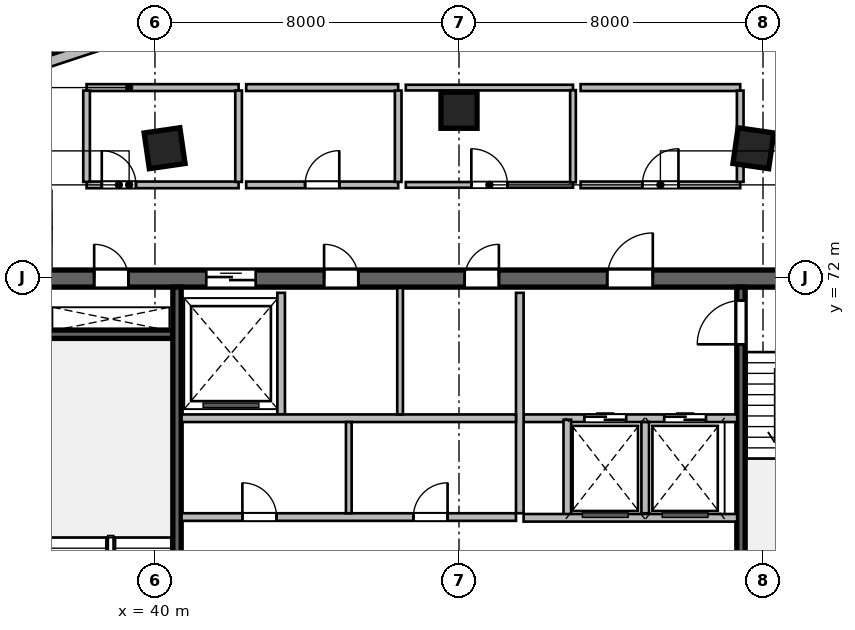
"""IFC4 building model, lengths in metres.
Left out: names, types, materials, properties, quantities, classifications, styles, units other than length and angle.
Written with IfcOpenShell. Run it as: python <this file> out.ifc"""

import sys

from ifc_helpers import new_model, si_unit, direction, frame, frame_2d, origin, origin_2d, place, context, subcontext, project, spatial, rectangle, extrude, source, transform, mapped, element, fill, save


model = new_model("IFC4")
c1 = context("Model", 3, precision=1e-05, world=origin(), true_north=direction((0.0, 1.0)))
c2 = subcontext(c1, "Body", "Model", "MODEL_VIEW")
j1 = project(units=[si_unit("LENGTHUNIT", "METRE"), si_unit("PLANEANGLEUNIT", "RADIAN")], contexts=[c1])
p1 = place(None, origin())
s1 = spatial("IfcSite", under=j1, at=p1, CompositionType="ELEMENT")
p2 = place(p1, origin())
s2 = spatial("IfcBuilding", under=s1, at=p2, CompositionType="ELEMENT")
p3 = place(p2, frame((0.0, 0.0, 235.2)))
s3 = spatial("IfcBuildingStorey", under=s2, at=p3, CompositionType="ELEMENT", Elevation=235.2)
m1 = source(origin(), c2, "Body", "SweptSolid", [
    extrude(rectangle(XDim=21.6, YDim=0.45, at=frame_2d((10.8, 0.0))), origin(), (0.0, 0.0, 1.0), 3.9),
])
p4 = place(p3, frame((37.2, 71.975, 0.0), z_axis=(0.0, 0.0, 1.0), x_axis=(1.0, 0.0, 0.0)))
e1 = element("IfcWall", 1, at=p4, inside=s3, PredefinedType="SHEAR", context=c2, shape_type="MappedRepresentation", body=[
    mapped(m1, transform((0.0, 0.0, 0.0), scale=1.0)),
])
p5 = place(p4, frame((1.2, 0.0, 0.0)))
e2 = element("IfcOpeningElement", 2, at=p5, cuts=e1, PredefinedType="OPENING", context=c2, shape_type="SweptSolid", body=[
    extrude(rectangle(XDim=0.9, YDim=2.1, at=frame_2d((0.45, 1.05))), frame((0.0, 0.235, 0.0), z_axis=(0.0, -1.0, 0.0), x_axis=(1.0, 0.0, 0.0)), (0.0, 0.0, 1.0), 0.47),
])
p6 = place(p4, frame((14.7, 0.0, 0.0)))
e3 = element("IfcOpeningElement", 3, at=p6, cuts=e1, PredefinedType="OPENING", context=c2, shape_type="SweptSolid", body=[
    extrude(rectangle(XDim=1.2, YDim=2.15, at=frame_2d((0.6, 1.075))), frame((0.0, 0.235, 0.0), z_axis=(0.0, -1.0, 0.0), x_axis=(1.0, 0.0, 0.0)), (0.0, 0.0, 1.0), 0.47),
])
p7 = place(p4, frame((4.15, 0.0, 0.0)))
e4 = element("IfcOpeningElement", 4, at=p7, cuts=e1, PredefinedType="OPENING", context=c2, shape_type="SweptSolid", body=[
    extrude(rectangle(XDim=1.3, YDim=2.15, at=frame_2d((0.65, 1.075))), frame((0.0, 0.235, 0.0), z_axis=(0.0, -1.0, 0.0), x_axis=(1.0, 0.0, 0.0)), (0.0, 0.0, 1.0), 0.47),
])
p8 = place(p4, frame((7.25, 0.0, 0.0)))
e5 = element("IfcOpeningElement", 5, at=p8, cuts=e1, PredefinedType="OPENING", context=c2, shape_type="SweptSolid", body=[
    extrude(rectangle(XDim=0.9, YDim=2.1, at=frame_2d((0.45, 1.05))), frame((0.0, 0.235, 0.0), z_axis=(0.0, -1.0, 0.0), x_axis=(1.0, 0.0, 0.0)), (0.0, 0.0, 1.0), 0.47),
])
p9 = place(p4, frame((10.95, 0.0, 0.0)))
e6 = element("IfcOpeningElement", 6, at=p9, cuts=e1, PredefinedType="OPENING", context=c2, shape_type="SweptSolid", body=[
    extrude(rectangle(XDim=0.9, YDim=2.1, at=frame_2d((0.45, 1.05))), frame((0.0, 0.235, 0.0), z_axis=(0.0, -1.0, 0.0), x_axis=(1.0, 0.0, 0.0)), (0.0, 0.0, 1.0), 0.47),
])
m2 = source(origin(), c2, "Body", "SweptSolid", [
    extrude(rectangle(XDim=3.27, YDim=0.22, at=frame_2d((1.635, 0.0))), origin(), (0.0, 0.0, 1.0), 3.9),
])
p10 = place(p3, frame((37.2, 70.51, 0.0), z_axis=(0.0, 0.0, 1.0), x_axis=(1.0, 0.0, 0.0)))
e7 = element("IfcWall", 7, at=p10, inside=s3, PredefinedType="SHEAR", context=c2, shape_type="MappedRepresentation", body=[
    mapped(m2, transform((0.0, 0.0, 0.0), scale=1.0)),
])
m3 = source(origin(), c2, "Body", "SweptSolid", [
    extrude(rectangle(XDim=11.1, YDim=0.22, at=frame_2d((5.55, 0.0))), origin(), (0.0, 0.0, 1.0), 3.9),
])
p11 = place(p3, frame((40.58, 60.65, 0.0), z_axis=(0.0, 0.0, 1.0), x_axis=(0.0, 1.0, 0.0)))
e8 = element("IfcWall", 8, at=p11, inside=s3, PredefinedType="SHEAR", context=c2, shape_type="MappedRepresentation", body=[
    mapped(m3, transform((0.0, 0.0, 0.0), scale=1.0)),
])
p12 = place(p3, frame((55.42, 60.65, 0.0), z_axis=(0.0, 0.0, 1.0), x_axis=(0.0, 1.0, 0.0)))
e9 = element("IfcWall", 9, at=p12, inside=s3, PredefinedType="SHEAR", context=c2, shape_type="MappedRepresentation", body=[
    mapped(m3, transform((0.0, 0.0, 0.0), scale=1.0)),
])
p13 = place(p12, frame((9.595, 0.0, 0.0)))
e10 = element("IfcOpeningElement", 10, at=p13, cuts=e9, PredefinedType="OPENING", context=c2, shape_type="SweptSolid", body=[
    extrude(rectangle(XDim=1.15, YDim=2.15, at=frame_2d((0.575, 1.075))), frame((0.0, 0.12, 0.0), z_axis=(0.0, -1.0, 0.0), x_axis=(1.0, 0.0, 0.0)), (0.0, 0.0, 1.0), 0.24),
])
m4 = source(origin(), c2, "Body", "SweptSolid", [
    extrude(rectangle(XDim=0.95, YDim=0.95, at=origin_2d()), origin(), (0.0, 0.0, 1.0), 3.9),
])
for number, where, z_axis, x_axis in (
    (11, (40.253, 75.404, 0.0), (0.0, 0.0, 1.0), (-0.143, 0.99, 0.0)),
    (12, (48.0, 76.404, 0.0), (0.0, 0.0, 1.0), (0.0, 1.0, 0.0)),
    (13, (55.747, 75.404, 0.0), (0.0, 0.0, 1.0), (0.143, 0.99, 0.0)),
):
    element("IfcColumn", number, at=place(p3, frame(where, z_axis=z_axis, x_axis=x_axis)), inside=s3, PredefinedType="COLUMN", context=c2, shape_type="MappedRepresentation", body=[
        mapped(m4, transform((0.0, 0.0, 0.0), scale=1.0)),
    ])
m5 = source(origin(), c2, "Body", "SweptSolid", [
    extrude(rectangle(XDim=3.557, YDim=0.28, at=frame_2d((1.778, 0.0))), origin(), (0.0, 0.0, 1.0), 3.65),
])
p14 = place(p3, frame((36.077, 77.307, 0.0), z_axis=(0.0, 0.0, 1.0), x_axis=(0.949687460385, 0.31319918197, 0.0)))
e14 = element("IfcWall", 14, at=p14, inside=s3, PredefinedType="SOLIDWALL", context=c2, shape_type="MappedRepresentation", body=[
    mapped(m5, transform((0.0, 0.0, 0.0), scale=1.0)),
])
m6 = source(origin(), c2, "Body", "SweptSolid", [
    extrude(rectangle(XDim=5.62, YDim=0.2, at=frame_2d((2.81, 0.0))), origin(), (0.0, 0.0, 1.0), 3.65),
])
p15 = place(p3, frame((49.7, 68.3, 0.0), z_axis=(0.0, 0.0, 1.0), x_axis=(1.0, 0.0, 0.0)))
e15 = element("IfcWall", 15, at=p15, inside=s3, PredefinedType="SOLIDWALL", context=c2, shape_type="MappedRepresentation", body=[
    mapped(m6, transform((0.0, 0.0, 0.0), scale=1.0)),
])
p16 = place(p15, frame((1.6, 0.0, 0.0)))
e16 = element("IfcOpeningElement", 16, at=p16, cuts=e15, PredefinedType="OPENING", context=c2, shape_type="SweptSolid", body=[
    extrude(rectangle(XDim=1.1, YDim=2.15, at=frame_2d((0.55, 1.075))), frame((0.0, 0.11, 0.0), z_axis=(0.0, -1.0, 0.0), x_axis=(1.0, 0.0, 0.0)), (0.0, 0.0, 1.0), 0.22),
])
p17 = place(p15, frame((3.7, 0.0, 0.0)))
e17 = element("IfcOpeningElement", 17, at=p17, cuts=e15, PredefinedType="OPENING", context=c2, shape_type="SweptSolid", body=[
    extrude(rectangle(XDim=1.1, YDim=2.15, at=frame_2d((0.55, 1.075))), frame((0.0, 0.11, 0.0), z_axis=(0.0, -1.0, 0.0), x_axis=(1.0, 0.0, 0.0)), (0.0, 0.0, 1.0), 0.22),
])
m7 = source(origin(), c2, "Body", "SweptSolid", [
    extrude(rectangle(XDim=5.8, YDim=0.2, at=frame_2d((2.9, 0.0))), origin(), (0.0, 0.0, 1.0), 3.65),
])
p18 = place(p3, frame((49.6, 65.8, 0.0), z_axis=(0.0, 0.0, 1.0), x_axis=(0.0, 1.0, 0.0)))
e18 = element("IfcWall", 18, at=p18, inside=s3, PredefinedType="SOLIDWALL", context=c2, shape_type="MappedRepresentation", body=[
    mapped(m7, transform((0.0, 0.0, 0.0), scale=1.0)),
])
m8 = source(origin(), c2, "Body", "SweptSolid", [
    extrude(rectangle(XDim=2.58, YDim=0.2, at=frame_2d((1.29, 0.0))), origin(), (0.0, 0.0, 1.0), 3.65),
])
p19 = place(p3, frame((50.85, 65.68, 0.0), z_axis=(0.0, 0.0, 1.0), x_axis=(0.0, 1.0, 0.0)))
e19 = element("IfcWall", 19, at=p19, inside=s3, PredefinedType="SOLIDWALL", context=c2, shape_type="MappedRepresentation", body=[
    mapped(m8, transform((0.0, 0.0, 0.0), scale=1.0)),
])
m9 = source(origin(), c2, "Body", "SweptSolid", [
    extrude(rectangle(XDim=2.4, YDim=0.2, at=frame_2d((1.2, 0.0))), origin(), (0.0, 0.0, 1.0), 3.65),
])
p20 = place(p3, frame((52.9, 65.8, 0.0), z_axis=(0.0, 0.0, 1.0), x_axis=(0.0, 1.0, 0.0)))
e20 = element("IfcWall", 20, at=p20, inside=s3, PredefinedType="SOLIDWALL", context=c2, shape_type="MappedRepresentation", body=[
    mapped(m9, transform((0.0, 0.0, 0.0), scale=1.0)),
])
p21 = place(p3, frame((49.7, 65.68, 0.0), z_axis=(0.0, 0.0, 1.0), x_axis=(1.0, 0.0, 0.0)))
e21 = element("IfcWall", 21, at=p21, inside=s3, PredefinedType="SOLIDWALL", context=c2, shape_type="MappedRepresentation", body=[
    mapped(m6, transform((0.0, 0.0, 0.0), scale=1.0)),
])
m10 = source(origin(), c2, "Body", "SweptSolid", [
    extrude(rectangle(XDim=3.2, YDim=0.2, at=frame_2d((1.6, 0.0))), origin(), (0.0, 0.0, 1.0), 3.65),
])
p22 = place(p3, frame((43.32, 68.4, 0.0), z_axis=(0.0, 0.0, 1.0), x_axis=(0.0, 1.0, 0.0)))
e22 = element("IfcWall", 22, at=p22, inside=s3, PredefinedType="SOLIDWALL", context=c2, shape_type="MappedRepresentation", body=[
    mapped(m10, transform((0.0, 0.0, 0.0), scale=1.0)),
])
m11 = source(origin(), c2, "Body", "SweptSolid", [
    extrude(rectangle(XDim=8.8, YDim=0.2, at=frame_2d((4.4, 0.0))), origin(), (0.0, 0.0, 1.0), 3.65),
])
p23 = place(p3, frame((40.7, 68.3, 0.0), z_axis=(0.0, 0.0, 1.0), x_axis=(1.0, 0.0, 0.0)))
e23 = element("IfcWall", 23, at=p23, inside=s3, PredefinedType="SOLIDWALL", context=c2, shape_type="MappedRepresentation", body=[
    mapped(m11, transform((0.0, 0.0, 0.0), scale=1.0)),
])
m12 = source(origin(), c2, "Body", "SweptSolid", [
    extrude(rectangle(XDim=3.33, YDim=0.15, at=frame_2d((1.665, 0.0))), origin(), (0.0, 0.0, 1.0), 3.65),
])
p24 = place(p3, frame((46.45, 68.4, 0.0), z_axis=(0.0, 0.0, 1.0), x_axis=(0.0, 1.0, 0.0)))
e24 = element("IfcWall", 24, at=p24, inside=s3, PredefinedType="PARTITIONING", context=c2, shape_type="MappedRepresentation", body=[
    mapped(m12, transform((0.0, 0.0, 0.0), scale=1.0)),
])
p25 = place(p3, frame((40.7, 65.7, 0.0), z_axis=(0.0, 0.0, 1.0), x_axis=(1.0, 0.0, 0.0)))
e25 = element("IfcWall", 25, at=p25, inside=s3, PredefinedType="SOLIDWALL", context=c2, shape_type="MappedRepresentation", body=[
    mapped(m11, transform((0.0, 0.0, 0.0), scale=1.0)),
])
p26 = place(p25, frame((1.6, 0.0, 0.0)))
e26 = element("IfcOpeningElement", 26, at=p26, cuts=e25, PredefinedType="OPENING", context=c2, shape_type="SweptSolid", body=[
    extrude(rectangle(XDim=0.9, YDim=2.1, at=frame_2d((0.45, 1.05))), frame((0.0, 0.11, 0.0), z_axis=(0.0, -1.0, 0.0), x_axis=(1.0, 0.0, 0.0)), (0.0, 0.0, 1.0), 0.22),
])
p27 = place(p25, frame((6.1, 0.0, 0.0)))
e27 = element("IfcOpeningElement", 27, at=p27, cuts=e25, PredefinedType="OPENING", context=c2, shape_type="SweptSolid", body=[
    extrude(rectangle(XDim=0.9, YDim=2.1, at=frame_2d((0.45, 1.05))), frame((0.0, 0.11, 0.0), z_axis=(0.0, -1.0, 0.0), x_axis=(1.0, 0.0, 0.0)), (0.0, 0.0, 1.0), 0.22),
])
m13 = source(origin(), c2, "Body", "SweptSolid", [
    extrude(rectangle(XDim=2.4, YDim=0.15, at=frame_2d((1.2, 0.0))), origin(), (0.0, 0.0, 1.0), 3.65),
])
p28 = place(p3, frame((45.1, 65.8, 0.0), z_axis=(0.0, 0.0, 1.0), x_axis=(0.0, 1.0, 0.0)))
e28 = element("IfcWall", 28, at=p28, inside=s3, PredefinedType="PARTITIONING", context=c2, shape_type="MappedRepresentation", body=[
    mapped(m13, transform((0.0, 0.0, 0.0), scale=1.0)),
])
m14 = source(origin(), c2, "Body", "SweptSolid", [
    extrude(rectangle(XDim=4.0, YDim=0.175, at=frame_2d((2.0, 0.0))), origin(), (0.0, 0.0, 1.0), 3.65),
])
p29 = place(p3, frame((38.2, 74.44, 0.0), z_axis=(0.0, 0.0, 1.0), x_axis=(1.0, 0.0, 0.0)))
e29 = element("IfcWall", 29, at=p29, inside=s3, PredefinedType="PARTITIONING", context=c2, shape_type="MappedRepresentation", body=[
    mapped(m14, transform((0.0, 0.0, 0.0), scale=1.0)),
])
p30 = place(p29, frame((0.4, 0.0, 0.0)))
e30 = element("IfcOpeningElement", 30, at=p30, cuts=e29, PredefinedType="OPENING", context=c2, shape_type="SweptSolid", body=[
    extrude(rectangle(XDim=0.9, YDim=2.08, at=frame_2d((0.45, 1.04))), frame((0.0, 0.098, 0.0), z_axis=(0.0, -1.0, 0.0), x_axis=(1.0, 0.0, 0.0)), (0.0, 0.0, 1.0), 0.195),
])
m15 = source(origin(), c2, "Body", "SweptSolid", [
    extrude(rectangle(XDim=4.0, YDim=0.18, at=frame_2d((2.0, 0.0))), origin(), (0.0, 0.0, 1.0), 3.65),
])
p31 = place(p3, frame((38.2, 77.0, 0.0), z_axis=(0.0, 0.0, 1.0), x_axis=(1.0, 0.0, 0.0)))
e31 = element("IfcWall", 31, at=p31, inside=s3, PredefinedType="PLUMBINGWALL", context=c2, shape_type="MappedRepresentation", body=[
    mapped(m15, transform((0.0, 0.0, 0.0), scale=1.0)),
])
m16 = source(origin(), c2, "Body", "SweptSolid", [
    extrude(rectangle(XDim=2.403, YDim=0.175, at=frame_2d((1.201, 0.0))), origin(), (0.0, 0.0, 1.0), 3.65),
])
for number, where, z_axis, x_axis in (
    (32, (38.2, 74.519, 0.0), (0.0, 0.0, 1.0), (0.0, 1.0, 0.0)),
    (33, (42.2, 74.519, 0.0), (0.0, 0.0, 1.0), (0.0, 1.0, 0.0)),
):
    element("IfcWall", number, at=place(p3, frame(where, z_axis=z_axis, x_axis=x_axis)), inside=s3, PredefinedType="PARTITIONING", context=c2, shape_type="MappedRepresentation", body=[
        mapped(m16, transform((0.0, 0.0, 0.0), scale=1.0)),
    ])
p32 = place(p3, frame((42.4, 74.44, 0.0), z_axis=(0.0, 0.0, 1.0), x_axis=(1.0, 0.0, 0.0)))
e34 = element("IfcWall", 34, at=p32, inside=s3, PredefinedType="PARTITIONING", context=c2, shape_type="MappedRepresentation", body=[
    mapped(m14, transform((0.0, 0.0, 0.0), scale=1.0)),
])
p33 = place(p32, frame((1.55, 0.0, 0.0)))
e35 = element("IfcOpeningElement", 35, at=p33, cuts=e34, PredefinedType="OPENING", context=c2, shape_type="SweptSolid", body=[
    extrude(rectangle(XDim=0.9, YDim=2.08, at=frame_2d((0.45, 1.04))), frame((0.0, 0.098, 0.0), z_axis=(0.0, -1.0, 0.0), x_axis=(1.0, 0.0, 0.0)), (0.0, 0.0, 1.0), 0.195),
])
p34 = place(p3, frame((42.4, 77.0, 0.0), z_axis=(0.0, 0.0, 1.0), x_axis=(1.0, 0.0, 0.0)))
e36 = element("IfcWall", 36, at=p34, inside=s3, PredefinedType="PLUMBINGWALL", context=c2, shape_type="MappedRepresentation", body=[
    mapped(m15, transform((0.0, 0.0, 0.0), scale=1.0)),
])
p35 = place(p3, frame((46.4, 74.519, 0.0), z_axis=(0.0, 0.0, 1.0), x_axis=(0.0, 1.0, 0.0)))
e37 = element("IfcWall", 37, at=p35, inside=s3, PredefinedType="PARTITIONING", context=c2, shape_type="MappedRepresentation", body=[
    mapped(m16, transform((0.0, 0.0, 0.0), scale=1.0)),
])
m17 = source(origin(), c2, "Body", "SweptSolid", [
    extrude(rectangle(XDim=4.4, YDim=0.15, at=frame_2d((2.2, 0.0))), origin(), (0.0, 0.0, 1.0), 3.65),
])
p36 = place(p3, frame((46.6, 74.44, 0.0), z_axis=(0.0, 0.0, 1.0), x_axis=(1.0, 0.0, 0.0)))
e38 = element("IfcWall", 38, at=p36, inside=s3, PredefinedType="PARTITIONING", context=c2, shape_type="MappedRepresentation", body=[
    mapped(m17, transform((0.0, 0.0, 0.0), scale=1.0)),
])
p37 = place(p36, frame((1.725, 0.0, 0.0)))
e39 = element("IfcOpeningElement", 39, at=p37, cuts=e38, PredefinedType="OPENING", context=c2, shape_type="SweptSolid", body=[
    extrude(rectangle(XDim=0.95, YDim=2.1, at=frame_2d((0.475, 1.05))), frame((0.0, 0.085, 0.0), z_axis=(0.0, -1.0, 0.0), x_axis=(1.0, 0.0, 0.0)), (0.0, 0.0, 1.0), 0.17),
])
p38 = place(p3, frame((46.6, 77.0, 0.0), z_axis=(0.0, 0.0, 1.0), x_axis=(1.0, 0.0, 0.0)))
e40 = element("IfcWall", 40, at=p38, inside=s3, PredefinedType="PARTITIONING", context=c2, shape_type="MappedRepresentation", body=[
    mapped(m17, transform((0.0, 0.0, 0.0), scale=1.0)),
])
m18 = source(origin(), c2, "Body", "SweptSolid", [
    extrude(rectangle(XDim=2.425, YDim=0.15, at=frame_2d((1.212, 0.0))), origin(), (0.0, 0.0, 1.0), 3.65),
])
p39 = place(p3, frame((51.0, 74.508, 0.0), z_axis=(0.0, 0.0, 1.0), x_axis=(0.0, 1.0, 0.0)))
e41 = element("IfcWall", 41, at=p39, inside=s3, PredefinedType="PARTITIONING", context=c2, shape_type="MappedRepresentation", body=[
    mapped(m18, transform((0.0, 0.0, 0.0), scale=1.0)),
])
m19 = source(origin(), c2, "Body", "SweptSolid", [
    extrude(rectangle(XDim=4.2, YDim=0.175, at=frame_2d((2.1, 0.0))), origin(), (0.0, 0.0, 1.0), 3.65),
])
p40 = place(p3, frame((51.2, 74.44, 0.0), z_axis=(0.0, 0.0, 1.0), x_axis=(1.0, 0.0, 0.0)))
e42 = element("IfcWall", 42, at=p40, inside=s3, PredefinedType="PARTITIONING", context=c2, shape_type="MappedRepresentation", body=[
    mapped(m19, transform((0.0, 0.0, 0.0), scale=1.0)),
])
p41 = place(p40, frame((1.625, 0.0, 0.0)))
e43 = element("IfcOpeningElement", 43, at=p41, cuts=e42, PredefinedType="OPENING", context=c2, shape_type="SweptSolid", body=[
    extrude(rectangle(XDim=0.95, YDim=2.12, at=frame_2d((0.475, 1.06))), frame((0.0, 0.098, 0.0), z_axis=(0.0, -1.0, 0.0), x_axis=(1.0, 0.0, 0.0)), (0.0, 0.0, 1.0), 0.195),
])
m20 = source(origin(), c2, "Body", "SweptSolid", [
    extrude(rectangle(XDim=4.2, YDim=0.18, at=frame_2d((2.1, 0.0))), origin(), (0.0, 0.0, 1.0), 3.65),
])
p42 = place(p3, frame((51.2, 77.0, 0.0), z_axis=(0.0, 0.0, 1.0), x_axis=(1.0, 0.0, 0.0)))
e44 = element("IfcWall", 44, at=p42, inside=s3, PredefinedType="PLUMBINGWALL", context=c2, shape_type="MappedRepresentation", body=[
    mapped(m20, transform((0.0, 0.0, 0.0), scale=1.0)),
])
p43 = place(p3, frame((55.4, 74.519, 0.0), z_axis=(0.0, 0.0, 1.0), x_axis=(0.0, 1.0, 0.0)))
e45 = element("IfcWall", 45, at=p43, inside=s3, PredefinedType="PARTITIONING", context=c2, shape_type="MappedRepresentation", body=[
    mapped(m16, transform((0.0, 0.0, 0.0), scale=1.0)),
])
m21 = source(origin(), c2, "Body", "SweptSolid", [
    extrude(rectangle(XDim=0.9, YDim=2.1, at=frame_2d((0.45, 1.05))), frame((0.0, 0.025, 0.0), z_axis=(0.0, -1.0, 0.0), x_axis=(1.0, 0.0, 0.0)), (0.0, 0.0, 1.0), 0.05),
])
p44 = place(p5, origin())
e46 = element("IfcDoor", 46, at=p44, inside=s3, OperationType="SINGLE_SWING_LEFT", PredefinedType="DOOR", context=c2, shape_type="MappedRepresentation", body=[
    mapped(m21, transform((0.0, 0.0, 0.0), scale=1.0)),
])
fill(e2, e46)
m22 = source(origin(), c2, "Body", "SweptSolid", [
    extrude(rectangle(XDim=1.15, YDim=2.15, at=frame_2d((0.575, 1.075))), frame((0.0, 0.025, 0.0), z_axis=(0.0, -1.0, 0.0), x_axis=(1.0, 0.0, 0.0)), (0.0, 0.0, 1.0), 0.05),
])
p45 = place(p13, origin())
e47 = element("IfcDoor", 47, at=p45, inside=s3, OperationType="SINGLE_SWING_LEFT", PredefinedType="DOOR", context=c2, shape_type="MappedRepresentation", body=[
    mapped(m22, transform((0.0, 0.0, 0.0), scale=1.0)),
])
fill(e10, e47)
m23 = source(origin(), c2, "Body", "SweptSolid", [
    extrude(rectangle(XDim=1.2, YDim=2.15, at=frame_2d((0.6, 1.075))), frame((0.0, 0.025, 0.0), z_axis=(0.0, -1.0, 0.0), x_axis=(1.0, 0.0, 0.0)), (0.0, 0.0, 1.0), 0.05),
])
p46 = place(p6, origin())
e48 = element("IfcDoor", 48, at=p46, inside=s3, OperationType="SINGLE_SWING_RIGHT", PredefinedType="DOOR", context=c2, shape_type="MappedRepresentation", body=[
    mapped(m23, transform((0.0, 0.0, 0.0), scale=1.0)),
])
fill(e3, e48)
m24 = source(origin(), c2, "Body", "SweptSolid", [
    extrude(rectangle(XDim=1.1, YDim=2.15, at=frame_2d((0.55, 1.075))), frame((0.0, 0.025, 0.0), z_axis=(0.0, -1.0, 0.0), x_axis=(1.0, 0.0, 0.0)), (0.0, 0.0, 1.0), 0.05),
])
p47 = place(p16, origin())
e49 = element("IfcDoor", 49, at=p47, inside=s3, OperationType="DOUBLE_DOOR_SLIDING", PredefinedType="DOOR", context=c2, shape_type="MappedRepresentation", body=[
    mapped(m24, transform((0.0, 0.0, 0.0), scale=1.0)),
])
fill(e16, e49)
p48 = place(p17, origin())
e50 = element("IfcDoor", 50, at=p48, inside=s3, OperationType="DOUBLE_DOOR_SLIDING", PredefinedType="DOOR", context=c2, shape_type="MappedRepresentation", body=[
    mapped(m24, transform((0.0, 0.0, 0.0), scale=1.0)),
])
fill(e17, e50)
m25 = source(origin(), c2, "Body", "SweptSolid", [
    extrude(rectangle(XDim=1.3, YDim=2.15, at=frame_2d((0.65, 1.075))), frame((0.0, 0.025, 0.0), z_axis=(0.0, -1.0, 0.0), x_axis=(1.0, 0.0, 0.0)), (0.0, 0.0, 1.0), 0.05),
])
p49 = place(p7, origin())
e51 = element("IfcDoor", 51, at=p49, inside=s3, OperationType="DOUBLE_DOOR_SLIDING", PredefinedType="DOOR", context=c2, shape_type="MappedRepresentation", body=[
    mapped(m25, transform((0.0, 0.0, 0.0), scale=1.0)),
])
fill(e4, e51)
p50 = place(p8, origin())
e52 = element("IfcDoor", 52, at=p50, inside=s3, OperationType="SINGLE_SWING_LEFT", PredefinedType="DOOR", context=c2, shape_type="MappedRepresentation", body=[
    mapped(m21, transform((0.0, 0.0, 0.0), scale=1.0)),
])
fill(e5, e52)
p51 = place(p9, origin())
e53 = element("IfcDoor", 53, at=p51, inside=s3, OperationType="SINGLE_SWING_RIGHT", PredefinedType="DOOR", context=c2, shape_type="MappedRepresentation", body=[
    mapped(m21, transform((0.0, 0.0, 0.0), scale=1.0)),
])
fill(e6, e53)
p52 = place(p26, origin())
e54 = element("IfcDoor", 54, at=p52, inside=s3, OperationType="SINGLE_SWING_LEFT", PredefinedType="DOOR", context=c2, shape_type="MappedRepresentation", body=[
    mapped(m21, transform((0.0, 0.0, 0.0), scale=1.0)),
])
fill(e26, e54)
p53 = place(p27, origin())
e55 = element("IfcDoor", 55, at=p53, inside=s3, OperationType="SINGLE_SWING_RIGHT", PredefinedType="DOOR", context=c2, shape_type="MappedRepresentation", body=[
    mapped(m21, transform((0.0, 0.0, 0.0), scale=1.0)),
])
fill(e27, e55)
m26 = source(origin(), c2, "Body", "SweptSolid", [
    extrude(rectangle(XDim=0.9, YDim=2.08, at=frame_2d((0.45, 1.04))), frame((0.0, 0.025, 0.0), z_axis=(0.0, -1.0, 0.0), x_axis=(1.0, 0.0, 0.0)), (0.0, 0.0, 1.0), 0.05),
])
p54 = place(p30, origin())
e56 = element("IfcDoor", 56, at=p54, inside=s3, OperationType="SINGLE_SWING_LEFT", PredefinedType="DOOR", context=c2, shape_type="MappedRepresentation", body=[
    mapped(m26, transform((0.0, 0.0, 0.0), scale=1.0)),
])
fill(e30, e56)
p55 = place(p33, origin())
e57 = element("IfcDoor", 57, at=p55, inside=s3, OperationType="SINGLE_SWING_RIGHT", PredefinedType="DOOR", context=c2, shape_type="MappedRepresentation", body=[
    mapped(m26, transform((0.0, 0.0, 0.0), scale=1.0)),
])
fill(e35, e57)
m27 = source(origin(), c2, "Body", "SweptSolid", [
    extrude(rectangle(XDim=0.95, YDim=2.1, at=frame_2d((0.475, 1.05))), frame((0.0, 0.025, 0.0), z_axis=(0.0, -1.0, 0.0), x_axis=(1.0, 0.0, 0.0)), (0.0, 0.0, 1.0), 0.05),
])
p56 = place(p37, origin())
e58 = element("IfcDoor", 58, at=p56, inside=s3, OperationType="SINGLE_SWING_LEFT", PredefinedType="DOOR", context=c2, shape_type="MappedRepresentation", body=[
    mapped(m27, transform((0.0, 0.0, 0.0), scale=1.0)),
])
fill(e39, e58)
m28 = source(origin(), c2, "Body", "SweptSolid", [
    extrude(rectangle(XDim=0.95, YDim=2.12, at=frame_2d((0.475, 1.06))), frame((0.0, 0.025, 0.0), z_axis=(0.0, -1.0, 0.0), x_axis=(1.0, 0.0, 0.0)), (0.0, 0.0, 1.0), 0.05),
])
p57 = place(p41, origin())
e59 = element("IfcDoor", 59, at=p57, inside=s3, OperationType="SINGLE_SWING_RIGHT", PredefinedType="DOOR", context=c2, shape_type="MappedRepresentation", body=[
    mapped(m28, transform((0.0, 0.0, 0.0), scale=1.0)),
])
fill(e43, e59)
save(model, sys.argv[1])
